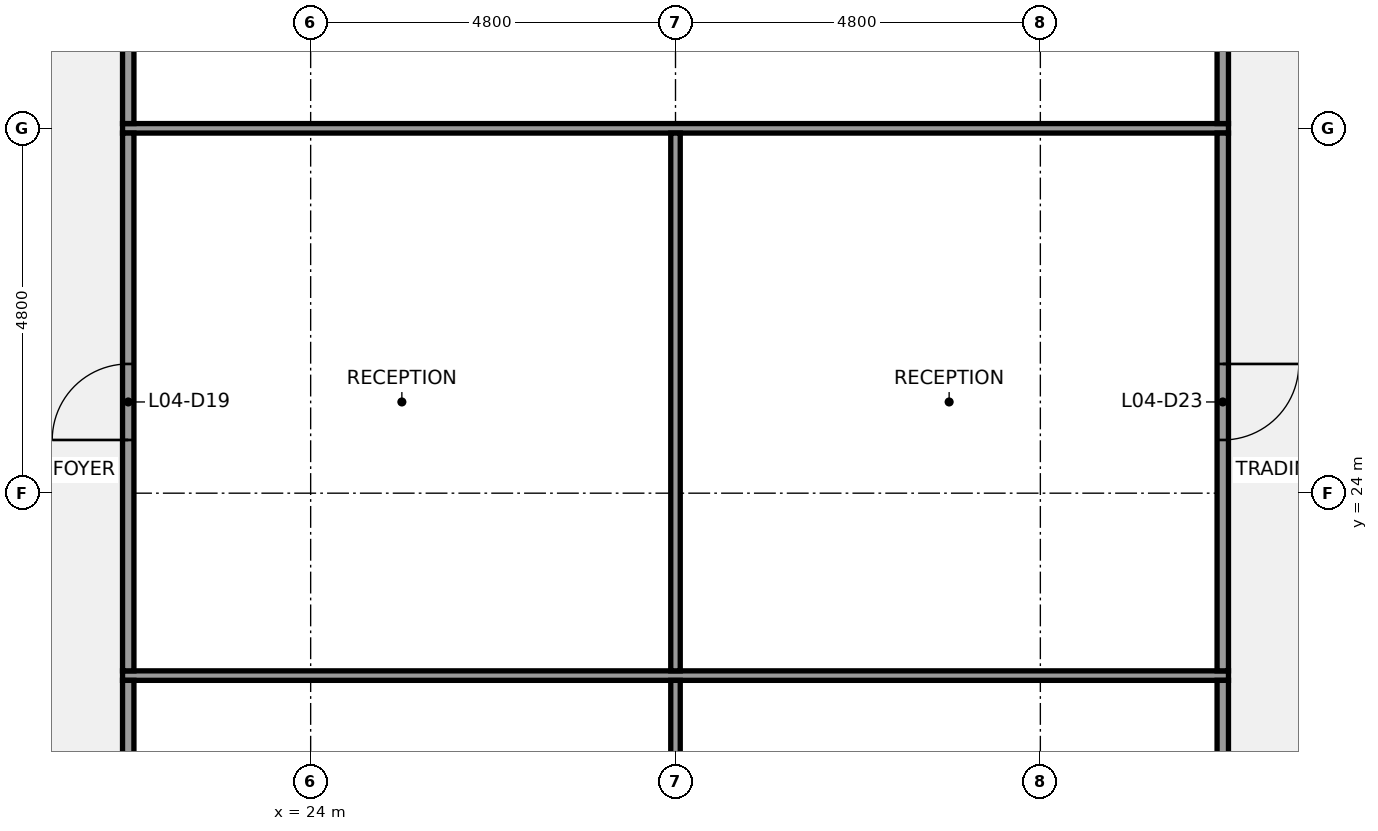
"""IFC4 building model, lengths in metres.
Left out: names, types, materials, properties, quantities, classifications, styles, units other than length and angle.
Written with IfcOpenShell. Run it as: python <this file> out.ifc"""

import sys

from ifc_helpers import new_model, si_unit, direction, frame, frame_2d, origin, place, context, subcontext, project, spatial, rectangle, extrude, element, fill, save


model = new_model("IFC4")
c1 = context("Model", 3, precision=1e-05, world=origin(), true_north=direction((0.0, 1.0)))
c2 = subcontext(c1, "Body", "Model", "MODEL_VIEW")
j1 = project(units=[si_unit("LENGTHUNIT", "METRE"), si_unit("PLANEANGLEUNIT", "RADIAN")], contexts=[c1])
p1 = place(None, origin())
s1 = spatial("IfcSite", under=j1, at=p1, CompositionType="ELEMENT")
p2 = place(p1, origin())
s2 = spatial("IfcBuilding", under=s1, at=p2, CompositionType="ELEMENT")
p3 = place(p2, frame((0.0, 0.0, 25.8)))
s3 = spatial("IfcBuildingStorey", under=s2, at=p3, CompositionType="ELEMENT", Elevation=25.8)
for number, where, z_axis, x_axis in (
    (1, (21.525, 21.6, 0.0), (0.0, 0.0, 1.0), (1.0, 0.0, 0.0)),
    (2, (21.525, 28.8, 0.0), (0.0, 0.0, 1.0), (1.0, 0.0, 0.0)),
):
    element("IfcWall", number, at=place(p3, frame(where, z_axis=z_axis, x_axis=x_axis)), inside=s3, PredefinedType="PARTITIONING", context=c2, shape_type="SweptSolid", body=[
        extrude(rectangle(XDim=14.55, YDim=0.125, at=frame_2d((7.275, 0.0))), origin(), (0.0, 0.0, 1.0), 3.27),
    ])
p4 = place(p3, frame((21.6, 16.863, 0.0), z_axis=(0.0, 0.0, 1.0), x_axis=(0.0, 1.0, 0.0)))
e3 = element("IfcWall", 3, at=p4, inside=s3, PredefinedType="PARTITIONING", context=c2, shape_type="SweptSolid", body=[
    extrude(rectangle(XDim=4.675, YDim=0.15, at=frame_2d((2.337, 0.0))), origin(), (0.0, 0.0, 1.0), 3.27),
])
p5 = place(p4, frame((1.837, 0.0, 0.0)))
e4 = element("IfcOpeningElement", 4, at=p5, cuts=e3, PredefinedType="OPENING", context=c2, shape_type="SweptSolid", body=[
    extrude(rectangle(XDim=1.0, YDim=2.1, at=frame_2d((0.5, 1.05))), frame((0.0, 0.085, 0.0), z_axis=(0.0, -1.0, 0.0), x_axis=(1.0, 0.0, 0.0)), (0.0, 0.0, 1.0), 0.17),
])
p6 = place(p3, frame((21.6, 21.663, 0.0), z_axis=(0.0, 0.0, 1.0), x_axis=(0.0, 1.0, 0.0)))
e5 = element("IfcWall", 5, at=p6, inside=s3, PredefinedType="PARTITIONING", context=c2, shape_type="SweptSolid", body=[
    extrude(rectangle(XDim=7.075, YDim=0.15, at=frame_2d((3.538, 0.0))), origin(), (0.0, 0.0, 1.0), 3.27),
])
p7 = place(p6, frame((3.038, 0.0, 0.0)))
e6 = element("IfcOpeningElement", 6, at=p7, cuts=e5, PredefinedType="OPENING", context=c2, shape_type="SweptSolid", body=[
    extrude(rectangle(XDim=1.0, YDim=2.1, at=frame_2d((0.5, 1.05))), frame((0.0, 0.085, 0.0), z_axis=(0.0, -1.0, 0.0), x_axis=(1.0, 0.0, 0.0)), (0.0, 0.0, 1.0), 0.17),
])
p8 = place(p3, frame((21.6, 28.863, 0.0), z_axis=(0.0, 0.0, 1.0), x_axis=(0.0, 1.0, 0.0)))
e7 = element("IfcWall", 7, at=p8, inside=s3, PredefinedType="PARTITIONING", context=c2, shape_type="SweptSolid", body=[
    extrude(rectangle(XDim=4.675, YDim=0.15, at=frame_2d((2.337, 0.0))), origin(), (0.0, 0.0, 1.0), 3.27),
])
p9 = place(p8, frame((1.837, 0.0, 0.0)))
e8 = element("IfcOpeningElement", 8, at=p9, cuts=e7, PredefinedType="OPENING", context=c2, shape_type="SweptSolid", body=[
    extrude(rectangle(XDim=1.0, YDim=2.1, at=frame_2d((0.5, 1.05))), frame((0.0, 0.085, 0.0), z_axis=(0.0, -1.0, 0.0), x_axis=(1.0, 0.0, 0.0)), (0.0, 0.0, 1.0), 0.17),
])
p10 = place(p3, frame((28.8, 16.863, 0.0), z_axis=(0.0, 0.0, 1.0), x_axis=(0.0, 1.0, 0.0)))
e9 = element("IfcWall", 9, at=p10, inside=s3, PredefinedType="PARTITIONING", context=c2, shape_type="SweptSolid", body=[
    extrude(rectangle(XDim=4.675, YDim=0.125, at=frame_2d((2.337, 0.0))), origin(), (0.0, 0.0, 1.0), 3.27),
])
p11 = place(p3, frame((28.8, 21.663, 0.0), z_axis=(0.0, 0.0, 1.0), x_axis=(0.0, 1.0, 0.0)))
e10 = element("IfcWall", 10, at=p11, inside=s3, PredefinedType="PARTITIONING", context=c2, shape_type="SweptSolid", body=[
    extrude(rectangle(XDim=7.075, YDim=0.125, at=frame_2d((3.538, 0.0))), origin(), (0.0, 0.0, 1.0), 3.27),
])
p12 = place(p3, frame((36.0, 16.863, 0.0), z_axis=(0.0, 0.0, 1.0), x_axis=(0.0, 1.0, 0.0)))
e11 = element("IfcWall", 11, at=p12, inside=s3, PredefinedType="PARTITIONING", context=c2, shape_type="SweptSolid", body=[
    extrude(rectangle(XDim=4.675, YDim=0.15, at=frame_2d((2.337, 0.0))), origin(), (0.0, 0.0, 1.0), 3.27),
])
p13 = place(p12, frame((1.837, 0.0, 0.0)))
e12 = element("IfcOpeningElement", 12, at=p13, cuts=e11, PredefinedType="OPENING", context=c2, shape_type="SweptSolid", body=[
    extrude(rectangle(XDim=1.0, YDim=2.1, at=frame_2d((0.5, 1.05))), frame((0.0, 0.085, 0.0), z_axis=(0.0, -1.0, 0.0), x_axis=(1.0, 0.0, 0.0)), (0.0, 0.0, 1.0), 0.17),
])
p14 = place(p3, frame((36.0, 21.663, 0.0), z_axis=(0.0, 0.0, 1.0), x_axis=(0.0, 1.0, 0.0)))
e13 = element("IfcWall", 13, at=p14, inside=s3, PredefinedType="PARTITIONING", context=c2, shape_type="SweptSolid", body=[
    extrude(rectangle(XDim=7.075, YDim=0.15, at=frame_2d((3.538, 0.0))), origin(), (0.0, 0.0, 1.0), 3.27),
])
p15 = place(p14, frame((3.038, 0.0, 0.0)))
e14 = element("IfcOpeningElement", 14, at=p15, cuts=e13, PredefinedType="OPENING", context=c2, shape_type="SweptSolid", body=[
    extrude(rectangle(XDim=1.0, YDim=2.1, at=frame_2d((0.5, 1.05))), frame((0.0, 0.085, 0.0), z_axis=(0.0, -1.0, 0.0), x_axis=(1.0, 0.0, 0.0)), (0.0, 0.0, 1.0), 0.17),
])
p16 = place(p3, frame((36.0, 28.863, 0.0), z_axis=(0.0, 0.0, 1.0), x_axis=(0.0, 1.0, 0.0)))
e15 = element("IfcWall", 15, at=p16, inside=s3, PredefinedType="PARTITIONING", context=c2, shape_type="SweptSolid", body=[
    extrude(rectangle(XDim=4.675, YDim=0.15, at=frame_2d((2.337, 0.0))), origin(), (0.0, 0.0, 1.0), 3.27),
])
p17 = place(p7, origin())
e16 = element("IfcDoor", 16, at=p17, inside=s3, OperationType="SINGLE_SWING_LEFT", PredefinedType="DOOR", context=c2, shape_type="SweptSolid", body=[
    extrude(rectangle(XDim=1.0, YDim=2.1, at=frame_2d((0.5, 1.05))), frame((0.0, 0.025, 0.0), z_axis=(0.0, -1.0, 0.0), x_axis=(1.0, 0.0, 0.0)), (0.0, 0.0, 1.0), 0.05),
])
fill(e6, e16)
p18 = place(p15, origin())
e17 = element("IfcDoor", 17, at=p18, inside=s3, OperationType="SINGLE_SWING_RIGHT", PredefinedType="DOOR", context=c2, shape_type="SweptSolid", body=[
    extrude(rectangle(XDim=1.0, YDim=2.1, at=frame_2d((0.5, 1.05))), frame((0.0, 0.025, 0.0), z_axis=(0.0, -1.0, 0.0), x_axis=(1.0, 0.0, 0.0)), (0.0, 0.0, 1.0), 0.05),
])
fill(e14, e17)
save(model, sys.argv[1])
